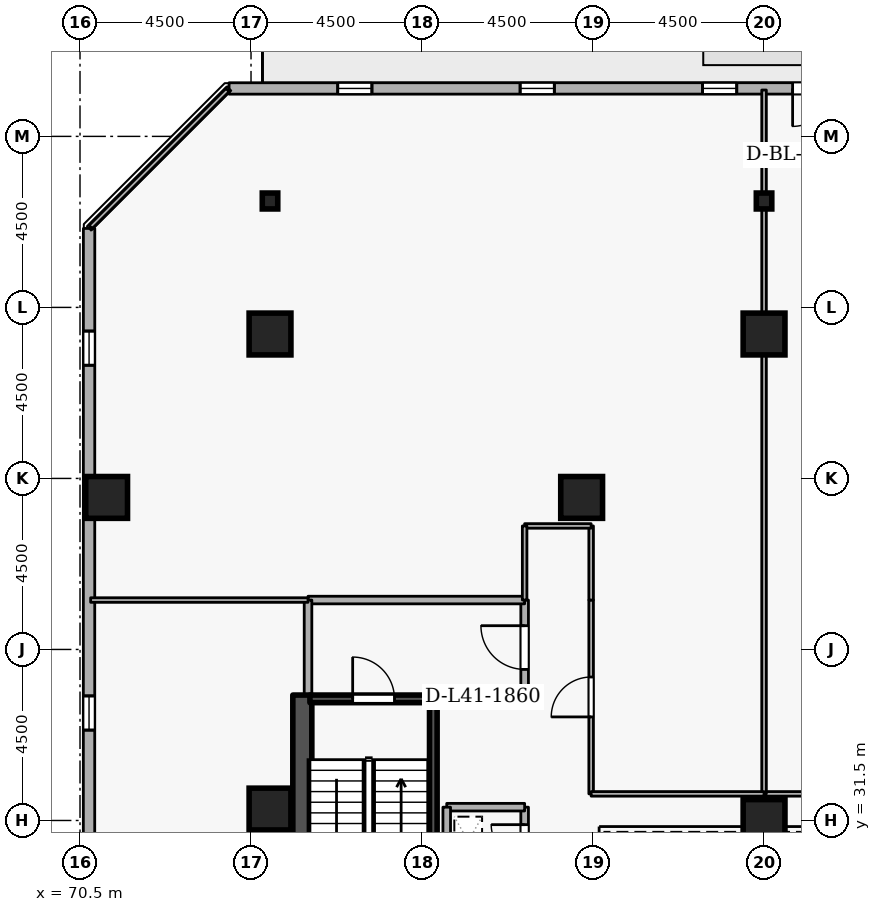
"""IFC4 building model, lengths in metres.
Left out: names, types, materials, properties, quantities, classifications, styles, units other than length and angle.
Written with IfcOpenShell. Run it as: python <this file> out.ifc"""

import sys

from ifc_helpers import new_model, si_unit, direction, frame, frame_2d, origin, origin_2d, place, context, subcontext, project, spatial, rectangle, i_section, extrude, element, fill, save


model = new_model("IFC4")
c1 = context("Model", 3, precision=1e-05, world=origin(), true_north=direction((0.0, 1.0)))
c2 = subcontext(c1, "Body", "Model", "MODEL_VIEW")
j1 = project(units=[si_unit("LENGTHUNIT", "METRE"), si_unit("PLANEANGLEUNIT", "RADIAN")], contexts=[c1])
p1 = place(None, origin())
s1 = spatial("IfcSite", under=j1, at=p1, CompositionType="ELEMENT")
p2 = place(p1, origin())
s2 = spatial("IfcBuilding", under=s1, at=p2, CompositionType="ELEMENT")
p3 = place(p2, frame((0.0, 0.0, 156.3)))
s3 = spatial("IfcBuildingStorey", under=s2, at=p3, CompositionType="ELEMENT", Elevation=156.3)
p4 = place(p3, frame((76.35, 19.2, 0.0), z_axis=(0.0, 0.0, 1.0), x_axis=(0.0, 1.0, 0.0)))
e1 = element("IfcWall", 1, at=p4, inside=s3, PredefinedType="SHEAR", context=c2, shape_type="SweptSolid", body=[
    extrude(rectangle(XDim=15.6, YDim=0.5, at=frame_2d((7.8, 0.0))), origin(), (0.0, 0.0, 1.0), 3.6),
])
for number, where, z_axis, x_axis in (
    (2, (88.5, 44.3, 0.0), (0.0, 0.0, 1.0), (1.0, 0.0, 0.0)),
    (3, (75.5, 44.3, 0.0), (0.0, 0.0, 1.0), (1.0, 0.0, 0.0)),
    (4, (71.2, 40.0, 0.0), (0.0, 0.0, 1.0), (1.0, 0.0, 0.0)),
    (5, (83.7, 40.0, 0.0), (0.0, 0.0, 1.0), (1.0, 0.0, 0.0)),
    (6, (75.5, 31.8, 0.0), (0.0, 0.0, 1.0), (1.0, 0.0, 0.0)),
    (7, (88.5, 31.5, 0.0), (0.0, 0.0, 1.0), (1.0, 0.0, 0.0)),
):
    element("IfcColumn", number, at=place(p3, frame(where, z_axis=z_axis, x_axis=x_axis)), inside=s3, PredefinedType="COLUMN", context=c2, shape_type="SweptSolid", body=[
        extrude(rectangle(XDim=1.1, YDim=1.1, at=origin_2d()), origin(), (0.0, 0.0, 1.0), 3.6),
    ])
for number, where, z_axis, x_axis in (
    (8, (88.5, 47.8, 0.0), (0.0, 0.0, 1.0), (1.0, 0.0, 0.0)),
    (9, (75.5, 47.8, 0.0), (0.0, 0.0, 1.0), (1.0, 0.0, 0.0)),
):
    element("IfcColumn", number, at=place(p3, frame(where, z_axis=z_axis, x_axis=x_axis)), inside=s3, PredefinedType="COLUMN", context=c2, shape_type="SweptSolid", body=[
        extrude(i_section(OverallWidth=0.407, OverallDepth=0.419, WebThickness=0.031, FlangeThickness=0.049, FilletRadius=0.015, at=origin_2d()), origin(), (0.0, 0.0, 1.0), 3.6),
    ])
p5 = place(p3, frame((109.681, 50.765, 0.0), z_axis=(0.0, 0.0, 1.0), x_axis=(-0.999999994606, -0.000103863011, 0.0)))
e10 = element("IfcWall", 10, at=p5, inside=s3, PredefinedType="STANDARD", context=c2, shape_type="SweptSolid", body=[
    extrude(rectangle(XDim=35.259, YDim=0.3, at=frame_2d((17.629, 0.0))), origin(), (0.0, 0.0, 1.0), 2.7),
])
p6 = place(p5, frame((19.43, 0.0, 0.0)))
e11 = element("IfcOpeningElement", 11, at=p6, cuts=e10, PredefinedType="OPENING", context=c2, shape_type="SweptSolid", body=[
    extrude(rectangle(XDim=1.0, YDim=2.08, at=frame_2d((0.5, 1.04))), frame((0.0, 0.16, 0.0), z_axis=(0.0, -1.0, 0.0), x_axis=(1.0, 0.0, 0.0)), (0.0, 0.0, 1.0), 0.32),
])
p7 = place(p5, frame((2.7, 0.0, 0.72)))
e12 = element("IfcOpeningElement", 12, at=p7, cuts=e10, PredefinedType="OPENING", context=c2, shape_type="SweptSolid", body=[
    extrude(rectangle(XDim=0.9, YDim=1.75, at=frame_2d((0.45, 0.875))), frame((0.0, 0.16, 0.0), z_axis=(0.0, -1.0, 0.0), x_axis=(1.0, 0.0, 0.0)), (0.0, 0.0, 1.0), 0.32),
])
p8 = place(p5, frame((7.5, 0.0, 0.72)))
e13 = element("IfcOpeningElement", 13, at=p8, cuts=e10, PredefinedType="OPENING", context=c2, shape_type="SweptSolid", body=[
    extrude(rectangle(XDim=0.9, YDim=1.75, at=frame_2d((0.45, 0.875))), frame((0.0, 0.16, 0.0), z_axis=(0.0, -1.0, 0.0), x_axis=(1.0, 0.0, 0.0)), (0.0, 0.0, 1.0), 0.32),
])
p9 = place(p5, frame((12.3, 0.0, 0.72)))
e14 = element("IfcOpeningElement", 14, at=p9, cuts=e10, PredefinedType="OPENING", context=c2, shape_type="SweptSolid", body=[
    extrude(rectangle(XDim=0.9, YDim=1.75, at=frame_2d((0.45, 0.875))), frame((0.0, 0.16, 0.0), z_axis=(0.0, -1.0, 0.0), x_axis=(1.0, 0.0, 0.0)), (0.0, 0.0, 1.0), 0.32),
])
p10 = place(p5, frame((17.1, 0.0, 0.72)))
e15 = element("IfcOpeningElement", 15, at=p10, cuts=e10, PredefinedType="OPENING", context=c2, shape_type="SweptSolid", body=[
    extrude(rectangle(XDim=0.9, YDim=1.75, at=frame_2d((0.45, 0.875))), frame((0.0, 0.16, 0.0), z_axis=(0.0, -1.0, 0.0), x_axis=(1.0, 0.0, 0.0)), (0.0, 0.0, 1.0), 0.32),
])
p11 = place(p5, frame((21.9, 0.0, 0.72)))
e16 = element("IfcOpeningElement", 16, at=p11, cuts=e10, PredefinedType="OPENING", context=c2, shape_type="SweptSolid", body=[
    extrude(rectangle(XDim=0.9, YDim=1.75, at=frame_2d((0.45, 0.875))), frame((0.0, 0.16, 0.0), z_axis=(0.0, -1.0, 0.0), x_axis=(1.0, 0.0, 0.0)), (0.0, 0.0, 1.0), 0.32),
])
p12 = place(p5, frame((26.7, 0.0, 0.72)))
e17 = element("IfcOpeningElement", 17, at=p12, cuts=e10, PredefinedType="OPENING", context=c2, shape_type="SweptSolid", body=[
    extrude(rectangle(XDim=0.9, YDim=1.75, at=frame_2d((0.45, 0.875))), frame((0.0, 0.16, 0.0), z_axis=(0.0, -1.0, 0.0), x_axis=(1.0, 0.0, 0.0)), (0.0, 0.0, 1.0), 0.32),
])
p13 = place(p5, frame((31.5, 0.0, 0.72)))
e18 = element("IfcOpeningElement", 18, at=p13, cuts=e10, PredefinedType="OPENING", context=c2, shape_type="SweptSolid", body=[
    extrude(rectangle(XDim=0.9, YDim=1.75, at=frame_2d((0.45, 0.875))), frame((0.0, 0.16, 0.0), z_axis=(0.0, -1.0, 0.0), x_axis=(1.0, 0.0, 0.0)), (0.0, 0.0, 1.0), 0.32),
])
p14 = place(p3, frame((70.739, 47.078, 0.0), z_axis=(0.0, 0.0, 1.0), x_axis=(-0.000103863011, -0.999999994606, 0.0)))
e19 = element("IfcWall", 19, at=p14, inside=s3, PredefinedType="STANDARD", context=c2, shape_type="SweptSolid", body=[
    extrude(rectangle(XDim=35.259, YDim=0.3, at=frame_2d((17.629, 0.0))), origin(), (0.0, 0.0, 1.0), 2.7),
])
p15 = place(p14, frame((2.7, 0.0, 0.72)))
e20 = element("IfcOpeningElement", 20, at=p15, cuts=e19, PredefinedType="OPENING", context=c2, shape_type="SweptSolid", body=[
    extrude(rectangle(XDim=0.9, YDim=1.75, at=frame_2d((0.45, 0.875))), frame((0.0, 0.16, 0.0), z_axis=(0.0, -1.0, 0.0), x_axis=(1.0, 0.0, 0.0)), (0.0, 0.0, 1.0), 0.32),
])
p16 = place(p14, frame((12.3, 0.0, 0.72)))
e21 = element("IfcOpeningElement", 21, at=p16, cuts=e19, PredefinedType="OPENING", context=c2, shape_type="SweptSolid", body=[
    extrude(rectangle(XDim=0.9, YDim=1.75, at=frame_2d((0.45, 0.875))), frame((0.0, 0.16, 0.0), z_axis=(0.0, -1.0, 0.0), x_axis=(1.0, 0.0, 0.0)), (0.0, 0.0, 1.0), 0.32),
])
p17 = place(p14, frame((17.1, 0.0, 0.72)))
e22 = element("IfcOpeningElement", 22, at=p17, cuts=e19, PredefinedType="OPENING", context=c2, shape_type="SweptSolid", body=[
    extrude(rectangle(XDim=0.9, YDim=1.75, at=frame_2d((0.45, 0.875))), frame((0.0, 0.16, 0.0), z_axis=(0.0, -1.0, 0.0), x_axis=(1.0, 0.0, 0.0)), (0.0, 0.0, 1.0), 0.32),
])
p18 = place(p14, frame((21.9, 0.0, 0.72)))
e23 = element("IfcOpeningElement", 23, at=p18, cuts=e19, PredefinedType="OPENING", context=c2, shape_type="SweptSolid", body=[
    extrude(rectangle(XDim=0.9, YDim=1.75, at=frame_2d((0.45, 0.875))), frame((0.0, 0.16, 0.0), z_axis=(0.0, -1.0, 0.0), x_axis=(1.0, 0.0, 0.0)), (0.0, 0.0, 1.0), 0.32),
])
p19 = place(p14, frame((26.7, 0.0, 0.72)))
e24 = element("IfcOpeningElement", 24, at=p19, cuts=e19, PredefinedType="OPENING", context=c2, shape_type="SweptSolid", body=[
    extrude(rectangle(XDim=0.9, YDim=1.75, at=frame_2d((0.45, 0.875))), frame((0.0, 0.16, 0.0), z_axis=(0.0, -1.0, 0.0), x_axis=(1.0, 0.0, 0.0)), (0.0, 0.0, 1.0), 0.32),
])
p20 = place(p3, frame((76.55, 34.7, 0.0), z_axis=(0.0, 0.0, 1.0), x_axis=(1.0, 0.0, 0.0)))
e25 = element("IfcWall", 25, at=p20, inside=s3, PredefinedType="SHEAR", context=c2, shape_type="SweptSolid", body=[
    extrude(rectangle(XDim=3.35, YDim=0.2, at=frame_2d((1.675, 0.0))), origin(), (0.0, 0.0, 1.0), 3.6),
])
p21 = place(p20, frame((1.125, 0.0, 0.0)))
e26 = element("IfcOpeningElement", 26, at=p21, cuts=e25, PredefinedType="OPENING", context=c2, shape_type="SweptSolid", body=[
    extrude(rectangle(XDim=1.1, YDim=2.1, at=frame_2d((0.55, 1.05))), frame((0.0, 0.11, 0.0), z_axis=(0.0, -1.0, 0.0), x_axis=(1.0, 0.0, 0.0)), (0.0, 0.0, 1.0), 0.22),
])
p22 = place(p3, frame((79.797, 27.45, 0.0), z_axis=(0.0, 0.0, 1.0), x_axis=(0.0, 1.0, 0.0)))
e27 = element("IfcWall", 27, at=p22, inside=s3, PredefinedType="SHEAR", context=c2, shape_type="SweptSolid", body=[
    extrude(rectangle(XDim=7.1, YDim=0.2, at=frame_2d((3.55, 0.0))), origin(), (0.0, 0.0, 1.0), 3.6),
])
p23 = place(p3, frame((79.9, 34.8, 0.0), z_axis=(0.0, 0.0, 1.0), x_axis=(1.0, 0.0, 0.0)))
e28 = element("IfcWall", 28, at=p23, inside=s3, PredefinedType="STANDARD", context=c2, shape_type="SweptSolid", body=[
    extrude(rectangle(XDim=2.3, YDim=0.2, at=frame_2d((1.15, 0.0))), origin(), (0.0, 0.0, 1.0), 2.545),
])
p24 = place(p3, frame((82.2, 34.8, 0.0), z_axis=(0.0, 0.0, 1.0), x_axis=(0.0, 1.0, 0.0)))
e29 = element("IfcWall", 29, at=p24, inside=s3, PredefinedType="STANDARD", context=c2, shape_type="SweptSolid", body=[
    extrude(rectangle(XDim=2.5, YDim=0.2, at=frame_2d((1.25, 0.0))), origin(), (0.0, 0.0, 1.0), 3.34),
])
p25 = place(p24, frame((0.675, 0.0, 0.0)))
e30 = element("IfcOpeningElement", 30, at=p25, cuts=e29, PredefinedType="OPENING", context=c2, shape_type="SweptSolid", body=[
    extrude(rectangle(XDim=1.15, YDim=2.1, at=frame_2d((0.575, 1.05))), frame((0.0, 0.11, 0.0), z_axis=(0.0, -1.0, 0.0), x_axis=(1.0, 0.0, 0.0)), (0.0, 0.0, 1.0), 0.22),
])
p26 = place(p3, frame((82.2, 37.3, 0.0), z_axis=(0.0, 0.0, 1.0), x_axis=(-1.0, 0.0, 0.0)))
e31 = element("IfcWall", 31, at=p26, inside=s3, PredefinedType="STANDARD", context=c2, shape_type="SweptSolid", body=[
    extrude(rectangle(XDim=5.7, YDim=0.2, at=frame_2d((2.85, 0.0))), origin(), (0.0, 0.0, 1.0), 3.34),
])
p27 = place(p3, frame((76.5, 37.3, 0.0), z_axis=(0.0, 0.0, 1.0), x_axis=(0.0, -1.0, 0.0)))
e32 = element("IfcWall", 32, at=p27, inside=s3, PredefinedType="STANDARD", context=c2, shape_type="SweptSolid", body=[
    extrude(rectangle(XDim=2.5, YDim=0.2, at=frame_2d((1.25, 0.0))), origin(), (0.0, 0.0, 1.0), 3.34),
])
p28 = place(p3, frame((82.2, 30.05, 0.0), z_axis=(0.0, 0.0, 1.0), x_axis=(0.0, 1.0, 0.0)))
e33 = element("IfcWall", 33, at=p28, inside=s3, PredefinedType="STANDARD", context=c2, shape_type="SweptSolid", body=[
    extrude(rectangle(XDim=1.8, YDim=0.2, at=frame_2d((0.9, 0.0))), origin(), (0.0, 0.0, 1.0), 3.34),
])
p29 = place(p28, frame((0.46, 0.0, 0.0)))
e34 = element("IfcOpeningElement", 34, at=p29, cuts=e33, PredefinedType="OPENING", context=c2, shape_type="SweptSolid", body=[
    extrude(rectangle(XDim=0.88, YDim=2.04, at=frame_2d((0.44, 1.02))), frame((0.0, 0.11, 0.0), z_axis=(0.0, -1.0, 0.0), x_axis=(1.0, 0.0, 0.0)), (0.0, 0.0, 1.0), 0.22),
])
p30 = place(p3, frame((82.2, 31.85, 0.0), z_axis=(0.0, 0.0, 1.0), x_axis=(-1.0, 0.0, 0.0)))
e35 = element("IfcWall", 35, at=p30, inside=s3, PredefinedType="STANDARD", context=c2, shape_type="SweptSolid", body=[
    extrude(rectangle(XDim=2.05, YDim=0.2, at=frame_2d((1.025, 0.0))), origin(), (0.0, 0.0, 1.0), 3.34),
])
p31 = place(p3, frame((80.15, 31.85, 0.0), z_axis=(0.0, 0.0, 1.0), x_axis=(0.0, -1.0, 0.0)))
e36 = element("IfcWall", 36, at=p31, inside=s3, PredefinedType="STANDARD", context=c2, shape_type="SweptSolid", body=[
    extrude(rectangle(XDim=1.8, YDim=0.2, at=frame_2d((0.9, 0.0))), origin(), (0.0, 0.0, 1.0), 3.34),
])
p32 = place(p3, frame((93.05, 32.2, 0.0), z_axis=(0.0, 0.0, 1.0), x_axis=(-1.0, 0.0, 0.0)))
e37 = element("IfcWall", 37, at=p32, inside=s3, PredefinedType="PARTITIONING", context=c2, shape_type="SweptSolid", body=[
    extrude(rectangle(XDim=4.55, YDim=0.12, at=frame_2d((2.275, 0.0))), origin(), (0.0, 0.0, 1.0), 3.34),
])
p33 = place(p3, frame((88.5, 32.2, 0.0), z_axis=(0.0, 0.0, 1.0), x_axis=(0.0, 1.0, 0.0)))
e38 = element("IfcWall", 38, at=p33, inside=s3, PredefinedType="PARTITIONING", context=c2, shape_type="SweptSolid", body=[
    extrude(rectangle(XDim=18.52, YDim=0.12, at=frame_2d((9.26, 0.0))), origin(), (0.0, 0.0, 1.0), 2.932),
])
p34 = place(p3, frame((83.95, 32.2, 0.0), z_axis=(0.0, 0.0, 1.0), x_axis=(0.0, 1.0, 0.0)))
e39 = element("IfcWall", 39, at=p34, inside=s3, PredefinedType="PARTITIONING", context=c2, shape_type="SweptSolid", body=[
    extrude(rectangle(XDim=5.1, YDim=0.12, at=frame_2d((2.55, 0.0))), origin(), (0.0, 0.0, 1.0), 3.34),
])
p35 = place(p34, frame((2.025, 0.0, 0.0)))
e40 = element("IfcOpeningElement", 40, at=p35, cuts=e39, PredefinedType="OPENING", context=c2, shape_type="SweptSolid", body=[
    extrude(rectangle(XDim=1.05, YDim=2.1, at=frame_2d((0.525, 1.05))), frame((0.0, 0.07, 0.0), z_axis=(0.0, -1.0, 0.0), x_axis=(1.0, 0.0, 0.0)), (0.0, 0.0, 1.0), 0.14),
])
p36 = place(p3, frame((83.95, 37.3, 0.0), z_axis=(0.0, 0.0, 1.0), x_axis=(0.0, 1.0, 0.0)))
e41 = element("IfcWall", 41, at=p36, inside=s3, PredefinedType="PARTITIONING", context=c2, shape_type="SweptSolid", body=[
    extrude(rectangle(XDim=1.95, YDim=0.12, at=frame_2d((0.975, 0.0))), origin(), (0.0, 0.0, 1.0), 3.34),
])
p37 = place(p3, frame((83.95, 39.25, 0.0), z_axis=(0.0, 0.0, 1.0), x_axis=(-1.0, 0.0, 0.0)))
e42 = element("IfcWall", 42, at=p37, inside=s3, PredefinedType="PARTITIONING", context=c2, shape_type="SweptSolid", body=[
    extrude(rectangle(XDim=1.75, YDim=0.12, at=frame_2d((0.875, 0.0))), origin(), (0.0, 0.0, 1.0), 3.34),
])
p38 = place(p3, frame((82.2, 39.25, 0.0), z_axis=(0.0, 0.0, 1.0), x_axis=(0.0, -1.0, 0.0)))
e43 = element("IfcWall", 43, at=p38, inside=s3, PredefinedType="PARTITIONING", context=c2, shape_type="SweptSolid", body=[
    extrude(rectangle(XDim=1.95, YDim=0.12, at=frame_2d((0.975, 0.0))), origin(), (0.0, 0.0, 1.0), 3.34),
])
p39 = place(p3, frame((76.5, 37.3, 0.0), z_axis=(0.0, 0.0, 1.0), x_axis=(-1.0, 0.0, 0.0)))
e44 = element("IfcWall", 44, at=p39, inside=s3, PredefinedType="PARTITIONING", context=c2, shape_type="SweptSolid", body=[
    extrude(rectangle(XDim=5.72, YDim=0.12, at=frame_2d((2.86, 0.0))), origin(), (0.0, 0.0, 1.0), 3.34),
])
p40 = place(p3, frame((70.78, 47.117, 0.0), z_axis=(0.0, 0.0, 1.0), x_axis=(0.707106781187, 0.707106781187, 0.0)))
e45 = element("IfcWall", 45, at=p40, inside=s3, PredefinedType="PARTITIONING", context=c2, shape_type="SweptSolid", body=[
    extrude(rectangle(XDim=5.095, YDim=0.12, at=frame_2d((2.547, 0.0))), origin(), (0.0, 0.0, 1.0), 3.34),
])
p41 = place(p3, frame((88.5, 32.2, 0.0), z_axis=(0.0, 0.0, 1.0), x_axis=(-1.0, 0.0, 0.0)))
e46 = element("IfcWall", 46, at=p41, inside=s3, PredefinedType="PARTITIONING", context=c2, shape_type="SweptSolid", body=[
    extrude(rectangle(XDim=4.55, YDim=0.12, at=frame_2d((2.275, 0.0))), origin(), (0.0, 0.0, 1.0), 3.34),
])
p42 = place(p6, origin())
e47 = element("IfcDoor", 47, at=p42, inside=s3, OperationType="SINGLE_SWING_RIGHT", PredefinedType="DOOR", context=c2, shape_type="SweptSolid", body=[
    extrude(rectangle(XDim=1.0, YDim=2.08, at=frame_2d((0.5, 1.04))), frame((0.0, 0.025, 0.0), z_axis=(0.0, -1.0, 0.0), x_axis=(1.0, 0.0, 0.0)), (0.0, 0.0, 1.0), 0.05),
])
fill(e11, e47)
p43 = place(p11, origin())
e48 = element("IfcWindow", 48, at=p43, inside=s3, PartitioningType="SINGLE_PANEL", PredefinedType="WINDOW", context=c2, shape_type="SweptSolid", body=[
    extrude(rectangle(XDim=0.9, YDim=1.75, at=frame_2d((0.45, 0.875))), frame((0.0, 0.03, 0.0), z_axis=(0.0, -1.0, 0.0), x_axis=(1.0, 0.0, 0.0)), (0.0, 0.0, 1.0), 0.06),
])
fill(e16, e48)
p44 = place(p12, origin())
e49 = element("IfcWindow", 49, at=p44, inside=s3, PartitioningType="SINGLE_PANEL", PredefinedType="WINDOW", context=c2, shape_type="SweptSolid", body=[
    extrude(rectangle(XDim=0.9, YDim=1.75, at=frame_2d((0.45, 0.875))), frame((0.0, 0.03, 0.0), z_axis=(0.0, -1.0, 0.0), x_axis=(1.0, 0.0, 0.0)), (0.0, 0.0, 1.0), 0.06),
])
fill(e17, e49)
p45 = place(p13, origin())
e50 = element("IfcWindow", 50, at=p45, inside=s3, PartitioningType="SINGLE_PANEL", PredefinedType="WINDOW", context=c2, shape_type="SweptSolid", body=[
    extrude(rectangle(XDim=0.9, YDim=1.75, at=frame_2d((0.45, 0.875))), frame((0.0, 0.03, 0.0), z_axis=(0.0, -1.0, 0.0), x_axis=(1.0, 0.0, 0.0)), (0.0, 0.0, 1.0), 0.06),
])
fill(e18, e50)
p46 = place(p15, origin())
e51 = element("IfcWindow", 51, at=p46, inside=s3, PartitioningType="SINGLE_PANEL", PredefinedType="WINDOW", context=c2, shape_type="SweptSolid", body=[
    extrude(rectangle(XDim=0.9, YDim=1.75, at=frame_2d((0.45, 0.875))), frame((0.0, 0.03, 0.0), z_axis=(0.0, -1.0, 0.0), x_axis=(1.0, 0.0, 0.0)), (0.0, 0.0, 1.0), 0.06),
])
fill(e20, e51)
p47 = place(p16, origin())
e52 = element("IfcWindow", 52, at=p47, inside=s3, PartitioningType="SINGLE_PANEL", PredefinedType="WINDOW", context=c2, shape_type="SweptSolid", body=[
    extrude(rectangle(XDim=0.9, YDim=1.75, at=frame_2d((0.45, 0.875))), frame((0.0, 0.03, 0.0), z_axis=(0.0, -1.0, 0.0), x_axis=(1.0, 0.0, 0.0)), (0.0, 0.0, 1.0), 0.06),
])
fill(e21, e52)
p48 = place(p21, origin())
e53 = element("IfcDoor", 53, at=p48, inside=s3, OperationType="SINGLE_SWING_LEFT", PredefinedType="DOOR", context=c2, shape_type="SweptSolid", body=[
    extrude(rectangle(XDim=1.1, YDim=2.1, at=frame_2d((0.55, 1.05))), frame((0.0, 0.025, 0.0), z_axis=(0.0, -1.0, 0.0), x_axis=(1.0, 0.0, 0.0)), (0.0, 0.0, 1.0), 0.05),
])
fill(e26, e53)
p49 = place(p25, origin())
e54 = element("IfcDoor", 54, at=p49, inside=s3, OperationType="SINGLE_SWING_RIGHT", PredefinedType="DOOR", context=c2, shape_type="SweptSolid", body=[
    extrude(rectangle(XDim=1.15, YDim=2.1, at=frame_2d((0.575, 1.05))), frame((0.0, 0.025, 0.0), z_axis=(0.0, -1.0, 0.0), x_axis=(1.0, 0.0, 0.0)), (0.0, 0.0, 1.0), 0.05),
])
fill(e30, e54)
p50 = place(p29, origin())
e55 = element("IfcDoor", 55, at=p50, inside=s3, OperationType="SINGLE_SWING_RIGHT", PredefinedType="DOOR", context=c2, shape_type="SweptSolid", body=[
    extrude(rectangle(XDim=0.88, YDim=2.04, at=frame_2d((0.44, 1.02))), frame((0.0, 0.025, 0.0), z_axis=(0.0, -1.0, 0.0), x_axis=(1.0, 0.0, 0.0)), (0.0, 0.0, 1.0), 0.05),
])
fill(e34, e55)
p51 = place(p35, origin())
e56 = element("IfcDoor", 56, at=p51, inside=s3, OperationType="SINGLE_SWING_LEFT", PredefinedType="DOOR", context=c2, shape_type="SweptSolid", body=[
    extrude(rectangle(XDim=1.05, YDim=2.1, at=frame_2d((0.525, 1.05))), frame((0.0, 0.025, 0.0), z_axis=(0.0, -1.0, 0.0), x_axis=(1.0, 0.0, 0.0)), (0.0, 0.0, 1.0), 0.05),
])
fill(e40, e56)
save(model, sys.argv[1])
